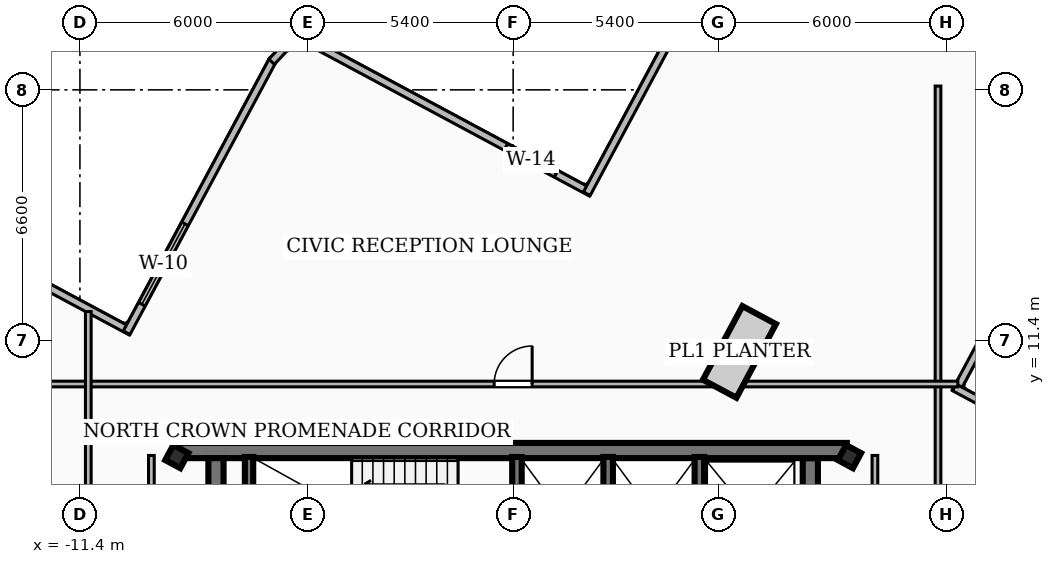
"""IFC4 building model, lengths in metres.
Left out: names, types, materials, properties, quantities, classifications, styles, units other than length and angle.
Written with IfcOpenShell. Run it as: python <this file> out.ifc"""

import sys

from ifc_helpers import new_model, si_unit, direction, frame, frame_2d, origin, origin_2d, place, context, subcontext, project, spatial, rectangle, hollow_rectangle, extrude, element, fill, save


model = new_model("IFC4")
c1 = context("Model", 3, precision=1e-05, world=origin(), true_north=direction((0.0, 1.0)))
c2 = subcontext(c1, "Body", "Model", "MODEL_VIEW")
j1 = project(units=[si_unit("LENGTHUNIT", "METRE"), si_unit("PLANEANGLEUNIT", "RADIAN")], contexts=[c1])
p1 = place(None, origin())
s1 = spatial("IfcSite", under=j1, at=p1, CompositionType="ELEMENT")
p2 = place(p1, origin())
s2 = spatial("IfcBuilding", under=s1, at=p2, CompositionType="ELEMENT")
p3 = place(p2, frame((0.0, 0.0, 285.12)))
s3 = spatial("IfcBuildingStorey", under=s2, at=p3, CompositionType="ELEMENT", Elevation=285.12)
p4 = place(p3, frame((-8.78, 8.51, 0.0), z_axis=(0.0, 0.0, 1.0), x_axis=(1.0, 0.0, 0.0)))
e1 = element("IfcWall", 1, at=p4, inside=s3, PredefinedType="SHEAR", context=c2, shape_type="SweptSolid", body=[
    extrude(rectangle(XDim=17.56, YDim=0.4, at=frame_2d((8.78, 0.0))), origin(), (0.0, 0.0, 1.0), 3.84),
])
for number, where, z_axis, x_axis in (
    (2, (-7.82, 1.95, 0.0), (0.0, 0.0, 1.0), (0.0, 1.0, 0.0)),
    (3, (7.82, 8.31, 0.0), (0.0, 0.0, 1.0), (0.0, -1.0, 0.0)),
):
    element("IfcWall", number, at=place(p3, frame(where, z_axis=z_axis, x_axis=x_axis)), inside=s3, PredefinedType="SHEAR", context=c2, shape_type="SweptSolid", body=[
        extrude(rectangle(XDim=6.36, YDim=0.4, at=frame_2d((3.18, 0.0))), origin(), (0.0, 0.0, 1.0), 3.84),
    ])
p5 = place(p3, frame((-6.95, 5.28, 0.0), z_axis=(0.0, 0.0, 1.0), x_axis=(0.0, 1.0, 0.0)))
e4 = element("IfcWall", 4, at=p5, inside=s3, PredefinedType="SOLIDWALL", context=c2, shape_type="SweptSolid", body=[
    extrude(rectangle(XDim=3.06, YDim=0.22, at=frame_2d((1.53, 0.0))), origin(), (0.0, 0.0, 1.0), 3.84),
])
for number, where, z_axis, x_axis in (
    (5, (0.1, 5.3, 0.0), (0.0, 0.0, 1.0), (0.0, 1.0, 0.0)),
    (6, (2.5, 5.3, 0.0), (0.0, 0.0, 1.0), (0.0, 1.0, 0.0)),
    (7, (4.9, 5.3, 0.0), (0.0, 0.0, 1.0), (0.0, 1.0, 0.0)),
):
    element("IfcWall", number, at=place(p3, frame(where, z_axis=z_axis, x_axis=x_axis)), inside=s3, PredefinedType="SOLIDWALL", context=c2, shape_type="SweptSolid", body=[
        extrude(rectangle(XDim=3.04, YDim=0.25, at=frame_2d((1.52, 0.0))), origin(), (0.0, 0.0, 1.0), 3.84),
    ])
for number, where, z_axis, x_axis in (
    (8, (-8.85, 8.35, 0.0), (0.0, 0.0, 1.0), (0.473, 0.881, 0.0)),
    (9, (8.85, 8.35, 0.0), (0.0, 0.0, 1.0), (0.473, 0.881, 0.0)),
):
    element("IfcColumn", number, at=place(p3, frame(where, z_axis=z_axis, x_axis=x_axis)), inside=s3, PredefinedType="COLUMN", context=c2, shape_type="SweptSolid", body=[
        extrude(hollow_rectangle(XDim=0.45, YDim=0.45, WallThickness=0.022, at=origin_2d()), origin(), (0.0, 0.0, 1.0), 4.14),
    ])
p6 = place(p3, frame((-12.268, 12.825, 0.0), z_axis=(0.0, 0.0, 1.0), x_axis=(0.881305917183, -0.472546167414, 0.0)))
e10 = element("IfcWall", 10, at=p6, inside=s3, PredefinedType="SOLIDWALL", context=c2, shape_type="SweptSolid", body=[
    extrude(rectangle(XDim=2.503, YDim=0.2, at=frame_2d((1.251, 0.0))), origin(), (0.0, 0.0, 1.0), 3.84),
])
p7 = place(p3, frame((-10.171, 11.609, 0.0), z_axis=(0.0, 0.0, 1.0), x_axis=(0.472535281242, 0.881311754138, 0.0)))
e11 = element("IfcWall", 11, at=p7, inside=s3, PredefinedType="SOLIDWALL", context=c2, shape_type="SweptSolid", body=[
    extrude(rectangle(XDim=8.137, YDim=0.2, at=frame_2d((4.068, 0.0))), origin(), (0.0, 0.0, 1.0), 3.84),
])
p8 = place(p7, frame((0.85, 0.0, 0.85)))
e12 = element("IfcOpeningElement", 12, at=p8, cuts=e11, PredefinedType="OPENING", context=c2, shape_type="SweptSolid", body=[
    extrude(rectangle(XDim=2.4, YDim=1.65, at=frame_2d((1.2, 0.825))), frame((0.0, 0.11, 0.0), z_axis=(0.0, -1.0, 0.0), x_axis=(1.0, 0.0, 0.0)), (0.0, 0.0, 1.0), 0.22),
])
p9 = place(p3, frame((-6.355, 18.74, 0.0), z_axis=(0.0, 0.0, 1.0), x_axis=(0.684079586619, 0.72940737532, 0.0)))
e13 = element("IfcWall", 13, at=p9, inside=s3, PredefinedType="SOLIDWALL", context=c2, shape_type="SweptSolid", body=[
    extrude(rectangle(XDim=0.528, YDim=0.2, at=frame_2d((0.264, 0.0))), origin(), (0.0, 0.0, 1.0), 3.84),
])
p10 = place(p3, frame((-5.124, 19.144, 0.0), z_axis=(0.0, 0.0, 1.0), x_axis=(0.881261771031, -0.472628491439, 0.0)))
e14 = element("IfcWall", 14, at=p10, inside=s3, PredefinedType="SOLIDWALL", context=c2, shape_type="SweptSolid", body=[
    extrude(rectangle(XDim=8.137, YDim=0.2, at=frame_2d((4.069, 0.0))), origin(), (0.0, 0.0, 1.0), 3.84),
])
p11 = place(p10, frame((5.597, 0.0, 0.85)))
e15 = element("IfcOpeningElement", 15, at=p11, cuts=e14, PredefinedType="OPENING", context=c2, shape_type="SweptSolid", body=[
    extrude(rectangle(XDim=1.5, YDim=1.5, at=frame_2d((0.75, 0.75))), frame((0.0, 0.11, 0.0), z_axis=(0.0, -1.0, 0.0), x_axis=(1.0, 0.0, 0.0)), (0.0, 0.0, 1.0), 0.22),
])
p12 = place(p3, frame((1.938, 15.266, 0.0), z_axis=(0.0, 0.0, 1.0), x_axis=(0.472735695129, 0.881204268346, 0.0)))
e16 = element("IfcWall", 16, at=p12, inside=s3, PredefinedType="SOLIDWALL", context=c2, shape_type="SweptSolid", body=[
    extrude(rectangle(XDim=7.442, YDim=0.2, at=frame_2d((3.721, 0.0))), origin(), (0.0, 0.0, 1.0), 3.84),
])
p13 = place(p3, frame((6.658, 22.187, 0.0), z_axis=(0.0, 0.0, 1.0), x_axis=(0.881325449165, -0.472509738158, 0.0)))
e17 = element("IfcWall", 17, at=p13, inside=s3, PredefinedType="SOLIDWALL", context=c2, shape_type="SweptSolid", body=[
    extrude(rectangle(XDim=9.234, YDim=0.2, at=frame_2d((4.617, 0.0))), origin(), (0.0, 0.0, 1.0), 3.84),
])
p14 = place(p13, frame((6.152, 0.0, 0.85)))
e18 = element("IfcOpeningElement", 18, at=p14, cuts=e17, PredefinedType="OPENING", context=c2, shape_type="SweptSolid", body=[
    extrude(rectangle(XDim=2.1, YDim=1.8, at=frame_2d((1.05, 0.9))), frame((0.0, 0.11, 0.0), z_axis=(0.0, -1.0, 0.0), x_axis=(1.0, 0.0, 0.0)), (0.0, 0.0, 1.0), 0.22),
])
p15 = place(p3, frame((15.159, 16.621, 0.0), z_axis=(0.0, 0.0, 1.0), x_axis=(-0.472539992266, -0.881309228199, 0.0)))
e19 = element("IfcWall", 19, at=p15, inside=s3, PredefinedType="SOLIDWALL", context=c2, shape_type="SweptSolid", body=[
    extrude(rectangle(XDim=7.442, YDim=0.2, at=frame_2d((3.721, 0.0))), origin(), (0.0, 0.0, 1.0), 3.84),
])
p16 = place(p3, frame((11.609, 10.171, 0.0), z_axis=(0.0, 0.0, 1.0), x_axis=(0.881311754138, -0.472535281242, 0.0)))
e20 = element("IfcWall", 20, at=p16, inside=s3, PredefinedType="SOLIDWALL", context=c2, shape_type="SweptSolid", body=[
    extrude(rectangle(XDim=8.137, YDim=0.2, at=frame_2d((4.068, 0.0))), origin(), (0.0, 0.0, 1.0), 3.84),
])
p17 = place(p16, frame((5.597, 0.0, 0.85)))
e21 = element("IfcOpeningElement", 21, at=p17, cuts=e20, PredefinedType="OPENING", context=c2, shape_type="SweptSolid", body=[
    extrude(rectangle(XDim=1.5, YDim=1.5, at=frame_2d((0.75, 0.75))), frame((0.0, 0.11, 0.0), z_axis=(0.0, -1.0, 0.0), x_axis=(1.0, 0.0, 0.0)), (0.0, 0.0, 1.0), 0.22),
])
p18 = place(p3, frame((-9.52, 1.75, 0.0), z_axis=(0.0, 0.0, 1.0), x_axis=(0.0, 1.0, 0.0)))
e22 = element("IfcWall", 22, at=p18, inside=s3, PredefinedType="PARTITIONING", context=c2, shape_type="SweptSolid", body=[
    extrude(rectangle(XDim=6.63, YDim=0.15, at=frame_2d((3.315, 0.0))), origin(), (0.0, 0.0, 1.0), 3.21),
])
p19 = place(p3, frame((9.52, 1.75, 0.0), z_axis=(0.0, 0.0, 1.0), x_axis=(0.0, 1.0, 0.0)))
e23 = element("IfcWall", 23, at=p19, inside=s3, PredefinedType="PARTITIONING", context=c2, shape_type="SweptSolid", body=[
    extrude(rectangle(XDim=6.63, YDim=0.15, at=frame_2d((3.315, 0.0))), origin(), (0.0, 0.0, 1.0), 3.84),
])
p20 = place(p3, frame((11.18, 18.1, 0.0), z_axis=(0.0, 0.0, 1.0), x_axis=(0.0, -1.0, 0.0)))
e24 = element("IfcWall", 24, at=p20, inside=s3, PredefinedType="PARTITIONING", context=c2, shape_type="SweptSolid", body=[
    extrude(rectangle(XDim=30.267, YDim=0.15, at=frame_2d((15.134, 0.0))), origin(), (0.0, 0.0, 1.0), 3.84),
])
p21 = place(p20, frame((17.6, 0.0, 0.0)))
e25 = element("IfcOpeningElement", 25, at=p21, cuts=e24, PredefinedType="OPENING", context=c2, shape_type="SweptSolid", body=[
    extrude(rectangle(XDim=1.0, YDim=2.1, at=frame_2d((0.5, 1.05))), frame((0.0, 0.085, 0.0), z_axis=(0.0, -1.0, 0.0), x_axis=(1.0, 0.0, 0.0)), (0.0, 0.0, 1.0), 0.17),
])
p22 = place(p3, frame((-14.577, 10.26, 0.0), z_axis=(0.0, 0.0, 1.0), x_axis=(1.0, 0.0, 0.0)))
e26 = element("IfcWall", 26, at=p22, inside=s3, PredefinedType="PARTITIONING", context=c2, shape_type="SweptSolid", body=[
    extrude(rectangle(XDim=26.278, YDim=0.15, at=frame_2d((13.139, 0.0))), origin(), (0.0, 0.0, 1.0), 3.21),
])
p23 = place(p22, frame((14.077, 0.0, 0.0)))
e27 = element("IfcOpeningElement", 27, at=p23, cuts=e26, PredefinedType="OPENING", context=c2, shape_type="SweptSolid", body=[
    extrude(rectangle(XDim=1.0, YDim=2.1, at=frame_2d((0.5, 1.05))), frame((0.0, 0.085, 0.0), z_axis=(0.0, -1.0, 0.0), x_axis=(1.0, 0.0, 0.0)), (0.0, 0.0, 1.0), 0.17),
])
p24 = place(p3, frame((-11.18, -11.928, 0.0), z_axis=(0.0, 0.0, 1.0), x_axis=(0.0, 1.0, 0.0)))
e28 = element("IfcWall", 28, at=p24, inside=s3, PredefinedType="PARTITIONING", context=c2, shape_type="SweptSolid", body=[
    extrude(rectangle(XDim=24.095, YDim=0.15, at=frame_2d((12.047, 0.0))), origin(), (0.0, 0.0, 1.0), 3.84),
])
p25 = place(p24, frame((9.828, 0.0, 0.0)))
e29 = element("IfcOpeningElement", 29, at=p25, cuts=e28, PredefinedType="OPENING", context=c2, shape_type="SweptSolid", body=[
    extrude(rectangle(XDim=1.0, YDim=2.1, at=frame_2d((0.5, 1.05))), frame((0.0, 0.085, 0.0), z_axis=(0.0, -1.0, 0.0), x_axis=(1.0, 0.0, 0.0)), (0.0, 0.0, 1.0), 0.17),
])
p26 = place(p8, origin())
e30 = element("IfcWindow", 30, at=p26, inside=s3, PartitioningType="SINGLE_PANEL", PredefinedType="WINDOW", context=c2, shape_type="SweptSolid", body=[
    extrude(rectangle(XDim=2.4, YDim=1.65, at=frame_2d((1.2, 0.825))), frame((0.0, 0.03, 0.0), z_axis=(0.0, -1.0, 0.0), x_axis=(1.0, 0.0, 0.0)), (0.0, 0.0, 1.0), 0.06),
])
fill(e12, e30)
p27 = place(p11, origin())
e31 = element("IfcWindow", 31, at=p27, inside=s3, PartitioningType="SINGLE_PANEL", PredefinedType="WINDOW", context=c2, shape_type="SweptSolid", body=[
    extrude(rectangle(XDim=1.5, YDim=1.5, at=frame_2d((0.75, 0.75))), frame((0.0, 0.03, 0.0), z_axis=(0.0, -1.0, 0.0), x_axis=(1.0, 0.0, 0.0)), (0.0, 0.0, 1.0), 0.06),
])
fill(e15, e31)
p28 = place(p14, origin())
e32 = element("IfcWindow", 32, at=p28, inside=s3, PartitioningType="SINGLE_PANEL", PredefinedType="WINDOW", context=c2, shape_type="SweptSolid", body=[
    extrude(rectangle(XDim=2.1, YDim=1.8, at=frame_2d((1.05, 0.9))), frame((0.0, 0.03, 0.0), z_axis=(0.0, -1.0, 0.0), x_axis=(1.0, 0.0, 0.0)), (0.0, 0.0, 1.0), 0.06),
])
fill(e18, e32)
p29 = place(p23, origin())
e33 = element("IfcDoor", 33, at=p29, inside=s3, OperationType="SINGLE_SWING_RIGHT", PredefinedType="DOOR", context=c2, shape_type="SweptSolid", body=[
    extrude(rectangle(XDim=1.0, YDim=2.1, at=frame_2d((0.5, 1.05))), frame((0.0, 0.025, 0.0), z_axis=(0.0, -1.0, 0.0), x_axis=(1.0, 0.0, 0.0)), (0.0, 0.0, 1.0), 0.05),
])
fill(e27, e33)
save(model, sys.argv[1])
